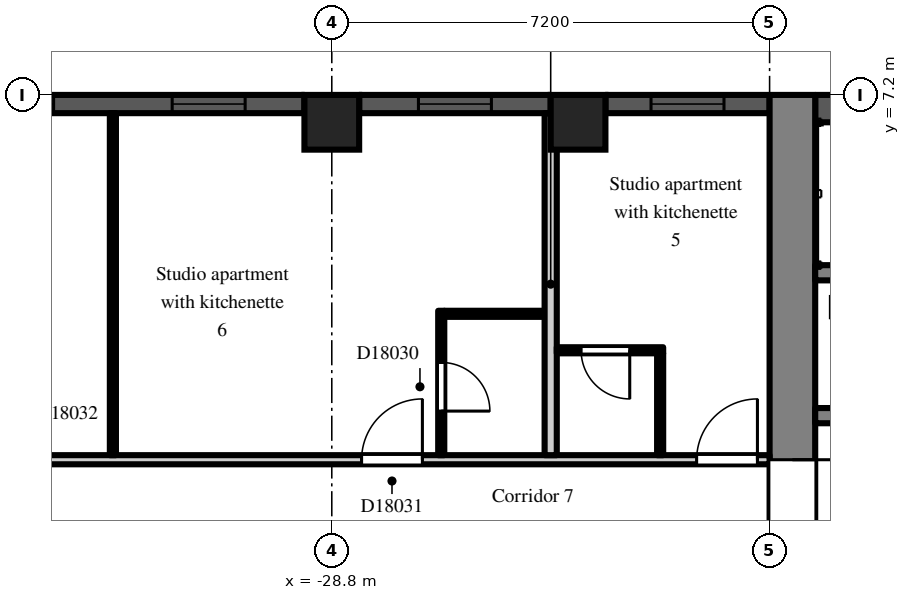
"""IFC4 building model, lengths in metres.
Left out: names, types, materials, properties, quantities, classifications, styles, units other than length and angle.
Written with IfcOpenShell. Run it as: python <this file> out.ifc"""

import sys

from ifc_helpers import new_model, si_unit, direction, frame, frame_2d, origin, origin_2d, place, context, subcontext, project, spatial, rectangle, extrude, element, fill, save


model = new_model("IFC4")
c1 = context("Model", 3, precision=1e-05, world=origin(), true_north=direction((0.0, 1.0)))
c2 = subcontext(c1, "Body", "Model", "MODEL_VIEW")
j1 = project(units=[si_unit("LENGTHUNIT", "METRE"), si_unit("PLANEANGLEUNIT", "RADIAN")], contexts=[c1])
p1 = place(None, origin())
s1 = spatial("IfcSite", under=j1, at=p1, CompositionType="ELEMENT")
p2 = place(p1, origin())
s2 = spatial("IfcBuilding", under=s1, at=p2, CompositionType="ELEMENT")
p3 = place(p2, frame((0.0, 0.0, 120.3)))
s3 = spatial("IfcBuildingStorey", under=s2, at=p3, CompositionType="ELEMENT", Elevation=120.3)
for number, where, z_axis, x_axis in (
    (1, (-28.8, 6.75, 0.0), (0.0, 0.0, 1.0), (1.0, 0.0, 0.0)),
    (2, (-24.75, 6.75, 0.0), (0.0, 0.0, 1.0), (1.0, 0.0, 0.0)),
):
    element("IfcColumn", number, at=place(p3, frame(where, z_axis=z_axis, x_axis=x_axis)), inside=s3, PredefinedType="COLUMN", context=c2, shape_type="SweptSolid", body=[
        extrude(rectangle(XDim=0.9, YDim=0.9, at=origin_2d()), origin(), (0.0, 0.0, 1.0), 3.0),
    ])
p4 = place(p3, frame((-21.6, 7.05, 0.0), z_axis=(0.0, 0.0, 1.0), x_axis=(-1.0, 0.0, 0.0)))
e3 = element("IfcWall", 3, at=p4, inside=s3, PredefinedType="SOLIDWALL", context=c2, shape_type="SweptSolid", body=[
    extrude(rectangle(XDim=2.7, YDim=0.3, at=frame_2d((1.35, 0.0))), origin(), (0.0, 0.0, 1.0), 2.2),
])
p5 = place(p4, frame((0.75, 0.0, 0.2)))
e4 = element("IfcOpeningElement", 4, at=p5, cuts=e3, PredefinedType="OPENING", context=c2, shape_type="SweptSolid", body=[
    extrude(rectangle(XDim=1.2, YDim=1.85, at=frame_2d((0.6, 0.925))), frame((0.0, 0.16, 0.0), z_axis=(0.0, -1.0, 0.0), x_axis=(1.0, 0.0, 0.0)), (0.0, 0.0, 1.0), 0.32),
])
p6 = place(p3, frame((-25.2, 7.05, 0.0), z_axis=(0.0, 0.0, 1.0), x_axis=(-1.0, 0.0, 0.0)))
e5 = element("IfcWall", 5, at=p6, inside=s3, PredefinedType="SOLIDWALL", context=c2, shape_type="SweptSolid", body=[
    extrude(rectangle(XDim=3.15, YDim=0.3, at=frame_2d((1.575, 0.0))), origin(), (0.0, 0.0, 1.0), 2.2),
])
p7 = place(p6, frame((0.975, 0.0, 0.2)))
e6 = element("IfcOpeningElement", 6, at=p7, cuts=e5, PredefinedType="OPENING", context=c2, shape_type="SweptSolid", body=[
    extrude(rectangle(XDim=1.2, YDim=1.85, at=frame_2d((0.6, 0.925))), frame((0.0, 0.16, 0.0), z_axis=(0.0, -1.0, 0.0), x_axis=(1.0, 0.0, 0.0)), (0.0, 0.0, 1.0), 0.32),
])
p8 = place(p3, frame((-29.25, 7.05, 0.0), z_axis=(0.0, 0.0, 1.0), x_axis=(-1.0, 0.0, 0.0)))
e7 = element("IfcWall", 7, at=p8, inside=s3, PredefinedType="SOLIDWALL", context=c2, shape_type="SweptSolid", body=[
    extrude(rectangle(XDim=6.3, YDim=0.3, at=frame_2d((3.15, 0.0))), origin(), (0.0, 0.0, 1.0), 2.2),
])
p9 = place(p8, frame((0.975, 0.0, 0.2)))
e8 = element("IfcOpeningElement", 8, at=p9, cuts=e7, PredefinedType="OPENING", context=c2, shape_type="SweptSolid", body=[
    extrude(rectangle(XDim=1.2, YDim=1.85, at=frame_2d((0.6, 0.925))), frame((0.0, 0.16, 0.0), z_axis=(0.0, -1.0, 0.0), x_axis=(1.0, 0.0, 0.0)), (0.0, 0.0, 1.0), 0.32),
])
p10 = place(p8, frame((4.125, 0.0, 0.2)))
e9 = element("IfcOpeningElement", 9, at=p10, cuts=e7, PredefinedType="OPENING", context=c2, shape_type="SweptSolid", body=[
    extrude(rectangle(XDim=1.2, YDim=1.85, at=frame_2d((0.6, 0.925))), frame((0.0, 0.16, 0.0), z_axis=(0.0, -1.0, 0.0), x_axis=(1.0, 0.0, 0.0)), (0.0, 0.0, 1.0), 0.32),
])
p11 = place(p3, frame((-21.225, -7.2, 0.0), z_axis=(0.0, 0.0, 1.0), x_axis=(0.0, 1.0, 0.0)))
e10 = element("IfcWall", 10, at=p11, inside=s3, PredefinedType="SHEAR", context=c2, shape_type="SweptSolid", body=[
    extrude(rectangle(XDim=14.4, YDim=0.75, at=frame_2d((7.2, 0.0))), origin(), (0.0, 0.0, 1.0), 2.6),
])
p12 = place(p11, frame((6.0, 0.0, 0.0)))
e11 = element("IfcOpeningElement", 11, at=p12, cuts=e10, PredefinedType="OPENING", context=c2, shape_type="SweptSolid", body=[
    extrude(rectangle(XDim=2.4, YDim=2.2, at=frame_2d((1.2, 1.1))), frame((0.0, 0.385, 0.0), z_axis=(0.0, -1.0, 0.0), x_axis=(1.0, 0.0, 0.0)), (0.0, 0.0, 1.0), 0.77),
])
p13 = place(p3, frame((-7.9, 6.975, 0.0), z_axis=(0.0, 0.0, 1.0), x_axis=(-1.0, 0.0, 0.0)))
e12 = element("IfcWall", 12, at=p13, inside=s3, PredefinedType="SHEAR", context=c2, shape_type="SweptSolid", body=[
    extrude(rectangle(XDim=12.95, YDim=0.45, at=frame_2d((6.475, 0.0))), origin(), (0.0, 0.0, 1.0), 2.6),
])
p14 = place(p3, frame((-7.9, 1.925, 0.0), z_axis=(0.0, 0.0, 1.0), x_axis=(-1.0, 0.0, 0.0)))
e13 = element("IfcWall", 13, at=p14, inside=s3, PredefinedType="SHEAR", context=c2, shape_type="SweptSolid", body=[
    extrude(rectangle(XDim=12.95, YDim=0.25, at=frame_2d((6.475, 0.0))), origin(), (0.0, 0.0, 1.0), 2.6),
])
p15 = place(p14, frame((4.825, 0.0, 0.0)))
e14 = element("IfcOpeningElement", 14, at=p15, cuts=e13, PredefinedType="OPENING", context=c2, shape_type="SweptSolid", body=[
    extrude(rectangle(XDim=1.1, YDim=2.1, at=frame_2d((0.55, 1.05))), frame((0.0, 0.135, 0.0), z_axis=(0.0, -1.0, 0.0), x_axis=(1.0, 0.0, 0.0)), (0.0, 0.0, 1.0), 0.27),
])
p16 = place(p14, frame((7.025, 0.0, 0.0)))
e15 = element("IfcOpeningElement", 15, at=p16, cuts=e13, PredefinedType="OPENING", context=c2, shape_type="SweptSolid", body=[
    extrude(rectangle(XDim=1.1, YDim=2.1, at=frame_2d((0.55, 1.05))), frame((0.0, 0.135, 0.0), z_axis=(0.0, -1.0, 0.0), x_axis=(1.0, 0.0, 0.0)), (0.0, 0.0, 1.0), 0.27),
])
p17 = place(p14, frame((9.225, 0.0, 0.0)))
e16 = element("IfcOpeningElement", 16, at=p17, cuts=e13, PredefinedType="OPENING", context=c2, shape_type="SweptSolid", body=[
    extrude(rectangle(XDim=1.1, YDim=2.1, at=frame_2d((0.55, 1.05))), frame((0.0, 0.135, 0.0), z_axis=(0.0, -1.0, 0.0), x_axis=(1.0, 0.0, 0.0)), (0.0, 0.0, 1.0), 0.27),
])
p18 = place(p14, frame((0.525, 0.0, 0.0)))
e17 = element("IfcOpeningElement", 17, at=p18, cuts=e13, PredefinedType="OPENING", context=c2, shape_type="SweptSolid", body=[
    extrude(rectangle(XDim=0.9, YDim=2.1, at=frame_2d((0.45, 1.05))), frame((0.0, 0.135, 0.0), z_axis=(0.0, -1.0, 0.0), x_axis=(1.0, 0.0, 0.0)), (0.0, 0.0, 1.0), 0.27),
])
p19 = place(p14, frame((2.625, 0.0, 0.0)))
e18 = element("IfcOpeningElement", 18, at=p19, cuts=e13, PredefinedType="OPENING", context=c2, shape_type="SweptSolid", body=[
    extrude(rectangle(XDim=1.1, YDim=2.1, at=frame_2d((0.55, 1.05))), frame((0.0, 0.135, 0.0), z_axis=(0.0, -1.0, 0.0), x_axis=(1.0, 0.0, 0.0)), (0.0, 0.0, 1.0), 0.27),
])
p20 = place(p3, frame((-12.3, 4.275, 0.0), z_axis=(0.0, 0.0, 1.0), x_axis=(-1.0, 0.0, 0.0)))
e19 = element("IfcWall", 19, at=p20, inside=s3, PredefinedType="SHEAR", context=c2, shape_type="SweptSolid", body=[
    extrude(rectangle(XDim=8.55, YDim=0.25, at=frame_2d((4.275, 0.0))), origin(), (0.0, 0.0, 1.0), 2.6),
])
p21 = place(p3, frame((-36.5, 1.2, 0.0), z_axis=(0.0, 0.0, 1.0), x_axis=(1.0, 0.0, 0.0)))
e20 = element("IfcWall", 20, at=p21, inside=s3, PredefinedType="PARTITIONING", context=c2, shape_type="SweptSolid", body=[
    extrude(rectangle(XDim=14.9, YDim=0.15, at=frame_2d((7.45, 0.0))), origin(), (0.0, 0.0, 1.0), 2.6),
])
p22 = place(p21, frame((13.7, 0.0, 0.0)))
e21 = element("IfcOpeningElement", 21, at=p22, cuts=e20, PredefinedType="OPENING", context=c2, shape_type="SweptSolid", body=[
    extrude(rectangle(XDim=1.0, YDim=2.1, at=frame_2d((0.5, 1.05))), frame((0.0, 0.085, 0.0), z_axis=(0.0, -1.0, 0.0), x_axis=(1.0, 0.0, 0.0)), (0.0, 0.0, 1.0), 0.17),
])
p23 = place(p21, frame((8.19, 0.0, 0.0)))
e22 = element("IfcOpeningElement", 22, at=p23, cuts=e20, PredefinedType="OPENING", context=c2, shape_type="SweptSolid", body=[
    extrude(rectangle(XDim=1.0, YDim=2.1, at=frame_2d((0.5, 1.05))), frame((0.0, 0.085, 0.0), z_axis=(0.0, -1.0, 0.0), x_axis=(1.0, 0.0, 0.0)), (0.0, 0.0, 1.0), 0.17),
])
p24 = place(p21, frame((1.15, 0.0, 0.0)))
e23 = element("IfcOpeningElement", 23, at=p24, cuts=e20, PredefinedType="OPENING", context=c2, shape_type="SweptSolid", body=[
    extrude(rectangle(XDim=1.8, YDim=2.1, at=frame_2d((0.9, 1.05))), frame((0.0, 0.085, 0.0), z_axis=(0.0, -1.0, 0.0), x_axis=(1.0, 0.0, 0.0)), (0.0, 0.0, 1.0), 0.17),
])
p25 = place(p3, frame((-32.4, 1.275, 0.0), z_axis=(0.0, 0.0, 1.0), x_axis=(0.0, 1.0, 0.0)))
e24 = element("IfcWall", 24, at=p25, inside=s3, PredefinedType="PARTITIONING", context=c2, shape_type="SweptSolid", body=[
    extrude(rectangle(XDim=5.625, YDim=0.1, at=frame_2d((2.812, 0.0))), origin(), (0.0, 0.0, 1.0), 2.6),
])
p26 = place(p3, frame((-27.0, 1.275, 0.0), z_axis=(0.0, 0.0, 1.0), x_axis=(0.0, 1.0, 0.0)))
e25 = element("IfcWall", 25, at=p26, inside=s3, PredefinedType="PARTITIONING", context=c2, shape_type="SweptSolid", body=[
    extrude(rectangle(XDim=2.375, YDim=0.1, at=frame_2d((1.188, 0.0))), origin(), (0.0, 0.0, 1.0), 2.6),
])
p27 = place(p26, frame((0.725, 0.0, 0.0)))
e26 = element("IfcOpeningElement", 26, at=p27, cuts=e25, PredefinedType="OPENING", context=c2, shape_type="SweptSolid", body=[
    extrude(rectangle(XDim=0.8, YDim=2.1, at=frame_2d((0.4, 1.05))), frame((0.0, 0.06, 0.0), z_axis=(0.0, -1.0, 0.0), x_axis=(1.0, 0.0, 0.0)), (0.0, 0.0, 1.0), 0.12),
])
p28 = place(p3, frame((-26.95, 3.6, 0.0), z_axis=(0.0, 0.0, 1.0), x_axis=(1.0, 0.0, 0.0)))
e27 = element("IfcWall", 27, at=p28, inside=s3, PredefinedType="PARTITIONING", context=c2, shape_type="SweptSolid", body=[
    extrude(rectangle(XDim=1.65, YDim=0.1, at=frame_2d((0.825, 0.0))), origin(), (0.0, 0.0, 1.0), 2.6),
])
p29 = place(p3, frame((-25.2, 1.275, 0.0), z_axis=(0.0, 0.0, 1.0), x_axis=(0.0, 1.0, 0.0)))
e28 = element("IfcWall", 28, at=p29, inside=s3, PredefinedType="PARTITIONING", context=c2, shape_type="SweptSolid", body=[
    extrude(rectangle(XDim=5.625, YDim=0.2, at=frame_2d((2.812, 0.0))), origin(), (0.0, 0.0, 1.0), 2.6),
])
p30 = place(p3, frame((-25.1, 3.0, 0.0), z_axis=(0.0, 0.0, 1.0), x_axis=(1.0, 0.0, 0.0)))
e29 = element("IfcWall", 29, at=p30, inside=s3, PredefinedType="PARTITIONING", context=c2, shape_type="SweptSolid", body=[
    extrude(rectangle(XDim=1.75, YDim=0.1, at=frame_2d((0.875, 0.0))), origin(), (0.0, 0.0, 1.0), 2.6),
])
p31 = place(p30, frame((0.4, 0.0, 0.0)))
e30 = element("IfcOpeningElement", 30, at=p31, cuts=e29, PredefinedType="OPENING", context=c2, shape_type="SweptSolid", body=[
    extrude(rectangle(XDim=0.8, YDim=2.1, at=frame_2d((0.4, 1.05))), frame((0.0, 0.06, 0.0), z_axis=(0.0, -1.0, 0.0), x_axis=(1.0, 0.0, 0.0)), (0.0, 0.0, 1.0), 0.12),
])
p32 = place(p3, frame((-23.4, 1.275, 0.0), z_axis=(0.0, 0.0, 1.0), x_axis=(0.0, 1.0, 0.0)))
e31 = element("IfcWall", 31, at=p32, inside=s3, PredefinedType="PARTITIONING", context=c2, shape_type="SweptSolid", body=[
    extrude(rectangle(XDim=1.675, YDim=0.1, at=frame_2d((0.837, 0.0))), origin(), (0.0, 0.0, 1.0), 2.6),
])
p33 = place(p5, origin())
e32 = element("IfcWindow", 32, at=p33, inside=s3, PartitioningType="SINGLE_PANEL", PredefinedType="WINDOW", context=c2, shape_type="SweptSolid", body=[
    extrude(rectangle(XDim=1.2, YDim=1.85, at=frame_2d((0.6, 0.925))), frame((0.0, 0.03, 0.0), z_axis=(0.0, -1.0, 0.0), x_axis=(1.0, 0.0, 0.0)), (0.0, 0.0, 1.0), 0.06),
])
fill(e4, e32)
p34 = place(p7, origin())
e33 = element("IfcWindow", 33, at=p34, inside=s3, PartitioningType="SINGLE_PANEL", PredefinedType="WINDOW", context=c2, shape_type="SweptSolid", body=[
    extrude(rectangle(XDim=1.2, YDim=1.85, at=frame_2d((0.6, 0.925))), frame((0.0, 0.03, 0.0), z_axis=(0.0, -1.0, 0.0), x_axis=(1.0, 0.0, 0.0)), (0.0, 0.0, 1.0), 0.06),
])
fill(e6, e33)
p35 = place(p9, origin())
e34 = element("IfcWindow", 34, at=p35, inside=s3, PartitioningType="SINGLE_PANEL", PredefinedType="WINDOW", context=c2, shape_type="SweptSolid", body=[
    extrude(rectangle(XDim=1.2, YDim=1.85, at=frame_2d((0.6, 0.925))), frame((0.0, 0.03, 0.0), z_axis=(0.0, -1.0, 0.0), x_axis=(1.0, 0.0, 0.0)), (0.0, 0.0, 1.0), 0.06),
])
fill(e8, e34)
p36 = place(p10, origin())
e35 = element("IfcWindow", 35, at=p36, inside=s3, PartitioningType="SINGLE_PANEL", PredefinedType="WINDOW", context=c2, shape_type="SweptSolid", body=[
    extrude(rectangle(XDim=1.2, YDim=1.85, at=frame_2d((0.6, 0.925))), frame((0.0, 0.03, 0.0), z_axis=(0.0, -1.0, 0.0), x_axis=(1.0, 0.0, 0.0)), (0.0, 0.0, 1.0), 0.06),
])
fill(e9, e35)
p37 = place(p12, frame((2.4, 0.0, 0.0), z_axis=(0.0, 0.0, 1.0), x_axis=(-1.0, 0.0, 0.0)))
e36 = element("IfcDoor", 36, at=p37, inside=s3, OperationType="DOUBLE_DOOR_DOUBLE_SWING", PredefinedType="DOOR", context=c2, shape_type="SweptSolid", body=[
    extrude(rectangle(XDim=2.4, YDim=2.2, at=frame_2d((1.2, 1.1))), frame((0.0, 0.025, 0.0), z_axis=(0.0, -1.0, 0.0), x_axis=(1.0, 0.0, 0.0)), (0.0, 0.0, 1.0), 0.05),
])
fill(e11, e36)
p38 = place(p31, frame((0.8, 0.0, 0.0), z_axis=(0.0, 0.0, 1.0), x_axis=(-1.0, 0.0, 0.0)))
e37 = element("IfcDoor", 37, at=p38, inside=s3, OperationType="SINGLE_SWING_LEFT", PredefinedType="DOOR", context=c2, shape_type="SweptSolid", body=[
    extrude(rectangle(XDim=0.8, YDim=2.1, at=frame_2d((0.4, 1.05))), frame((0.0, 0.025, 0.0), z_axis=(0.0, -1.0, 0.0), x_axis=(1.0, 0.0, 0.0)), (0.0, 0.0, 1.0), 0.05),
])
fill(e30, e37)
p39 = place(p22, origin())
e38 = element("IfcDoor", 38, at=p39, inside=s3, OperationType="SINGLE_SWING_RIGHT", PredefinedType="DOOR", context=c2, shape_type="SweptSolid", body=[
    extrude(rectangle(XDim=1.0, YDim=2.1, at=frame_2d((0.5, 1.05))), frame((0.0, 0.025, 0.0), z_axis=(0.0, -1.0, 0.0), x_axis=(1.0, 0.0, 0.0)), (0.0, 0.0, 1.0), 0.05),
])
fill(e21, e38)
p40 = place(p27, frame((0.8, 0.0, 0.0), z_axis=(0.0, 0.0, 1.0), x_axis=(-1.0, 0.0, 0.0)))
e39 = element("IfcDoor", 39, at=p40, inside=s3, OperationType="SINGLE_SWING_RIGHT", PredefinedType="DOOR", context=c2, shape_type="SweptSolid", body=[
    extrude(rectangle(XDim=0.8, YDim=2.1, at=frame_2d((0.4, 1.05))), frame((0.0, 0.025, 0.0), z_axis=(0.0, -1.0, 0.0), x_axis=(1.0, 0.0, 0.0)), (0.0, 0.0, 1.0), 0.05),
])
fill(e26, e39)
p41 = place(p23, origin())
e40 = element("IfcDoor", 40, at=p41, inside=s3, OperationType="SINGLE_SWING_RIGHT", PredefinedType="DOOR", context=c2, shape_type="SweptSolid", body=[
    extrude(rectangle(XDim=1.0, YDim=2.1, at=frame_2d((0.5, 1.05))), frame((0.0, 0.025, 0.0), z_axis=(0.0, -1.0, 0.0), x_axis=(1.0, 0.0, 0.0)), (0.0, 0.0, 1.0), 0.05),
])
fill(e22, e40)
save(model, sys.argv[1])
